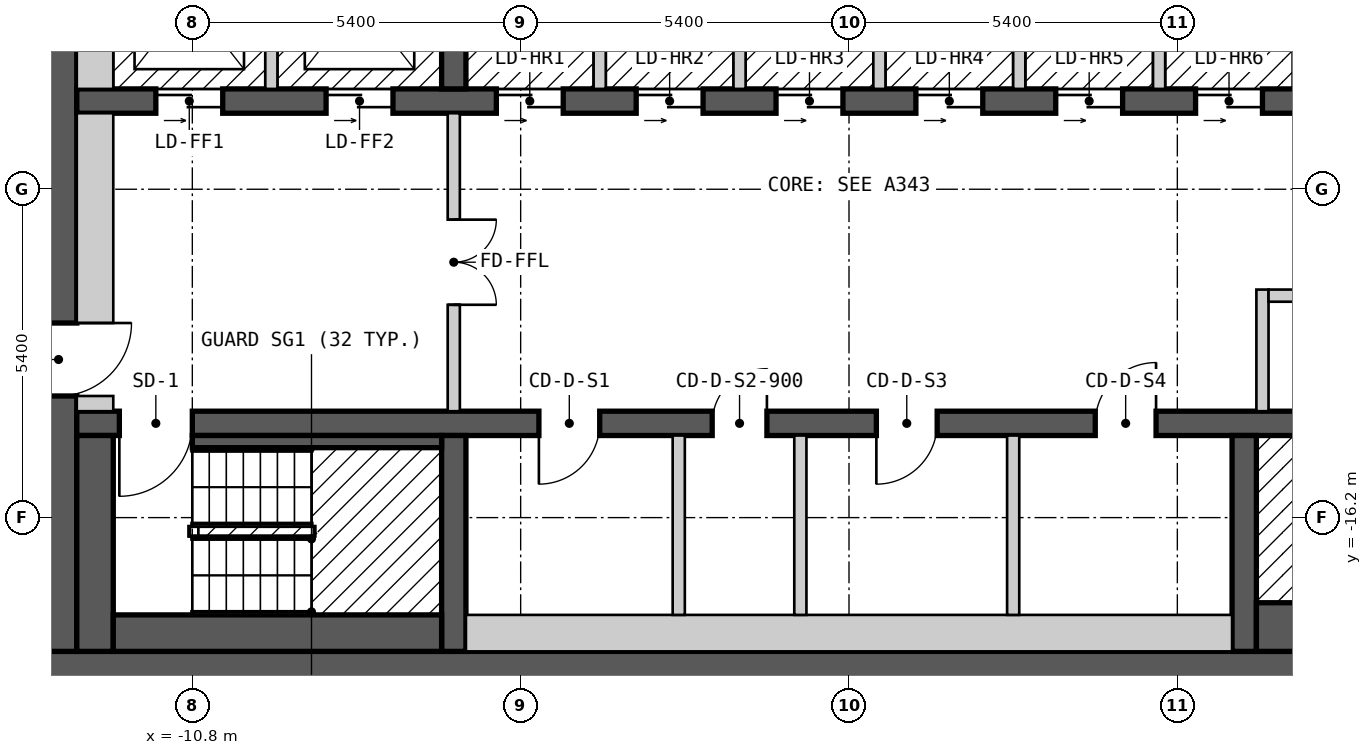
"""IFC4 building model, lengths in metres.
Left out: names, types, materials, properties, quantities, classifications, styles, units other than length and angle.
Written with IfcOpenShell. Run it as: python <this file> out.ifc"""

import sys

from ifc_helpers import new_model, si_unit, direction, frame, frame_2d, origin, place, context, subcontext, project, spatial, rectangle, extrude, element, fill, save


model = new_model("IFC4")
c1 = context("Model", 3, precision=1e-05, world=origin(), true_north=direction((0.0, 1.0)))
c2 = subcontext(c1, "Body", "Model", "MODEL_VIEW")
j1 = project(units=[si_unit("LENGTHUNIT", "METRE"), si_unit("PLANEANGLEUNIT", "RADIAN")], contexts=[c1])
p1 = place(None, origin())
s1 = spatial("IfcSite", under=j1, at=p1, CompositionType="ELEMENT")
p2 = place(p1, origin())
s2 = spatial("IfcBuilding", under=s1, at=p2, CompositionType="ELEMENT")
p3 = place(p2, frame((0.0, 0.0, 157.2)))
s3 = spatial("IfcBuildingStorey", under=s2, at=p3, CompositionType="ELEMENT", Elevation=157.2)
p4 = place(p3, frame((-13.3, -18.7, 0.0), z_axis=(0.0, 0.0, 1.0), x_axis=(1.0, 0.0, 0.0)))
e1 = element("IfcWall", 1, at=p4, inside=s3, PredefinedType="SHEAR", context=c2, shape_type="SweptSolid", body=[
    extrude(rectangle(XDim=26.6, YDim=0.6, at=frame_2d((13.3, 0.0))), origin(), (0.0, 0.0, 1.0), 5.7),
])
p5 = place(p3, frame((-13.0, -18.4, 0.0), z_axis=(0.0, 0.0, 1.0), x_axis=(0.0, 1.0, 0.0)))
e2 = element("IfcWall", 2, at=p5, inside=s3, PredefinedType="SHEAR", context=c2, shape_type="SweptSolid", body=[
    extrude(rectangle(XDim=12.8, YDim=0.6, at=frame_2d((6.4, 0.0))), origin(), (0.0, 0.0, 1.0), 5.7),
])
p6 = place(p5, frame((4.2, 0.0, 0.0)))
e3 = element("IfcOpeningElement", 3, at=p6, cuts=e2, PredefinedType="OPENING", context=c2, shape_type="SweptSolid", body=[
    extrude(rectangle(XDim=1.2, YDim=2.1, at=frame_2d((0.6, 1.05))), frame((0.0, 0.31, 0.0), z_axis=(0.0, -1.0, 0.0), x_axis=(1.0, 0.0, 0.0)), (0.0, 0.0, 1.0), 0.62),
])
p7 = place(p3, frame((-12.7, -14.65, 0.0), z_axis=(0.0, 0.0, 1.0), x_axis=(1.0, 0.0, 0.0)))
e4 = element("IfcWall", 4, at=p7, inside=s3, PredefinedType="SHEAR", context=c2, shape_type="SweptSolid", body=[
    extrude(rectangle(XDim=25.4, YDim=0.4, at=frame_2d((12.7, 0.0))), origin(), (0.0, 0.0, 1.0), 5.7),
])
p8 = place(p7, frame((1.9, 0.0, 0.0), z_axis=(0.0, 0.0, 1.0), x_axis=(-1.0, 0.0, 0.0)))
e5 = element("IfcOpeningElement", 5, at=p8, cuts=e4, PredefinedType="OPENING", context=c2, shape_type="SweptSolid", body=[
    extrude(rectangle(XDim=1.2, YDim=2.1, at=frame_2d((0.6, 1.05))), frame((0.0, 0.21, 0.0), z_axis=(0.0, -1.0, 0.0), x_axis=(1.0, 0.0, 0.0)), (0.0, 0.0, 1.0), 0.42),
])
p9 = place(p7, frame((24.75, 0.0, 0.0), z_axis=(0.0, 0.0, 1.0), x_axis=(-1.0, 0.0, 0.0)))
e6 = element("IfcOpeningElement", 6, at=p9, cuts=e4, PredefinedType="OPENING", context=c2, shape_type="SweptSolid", body=[
    extrude(rectangle(XDim=1.2, YDim=2.1, at=frame_2d((0.6, 1.05))), frame((0.0, 0.21, 0.0), z_axis=(0.0, -1.0, 0.0), x_axis=(1.0, 0.0, 0.0)), (0.0, 0.0, 1.0), 0.42),
])
p10 = place(p7, frame((8.6, 0.0, 0.0), z_axis=(0.0, 0.0, 1.0), x_axis=(-1.0, 0.0, 0.0)))
e7 = element("IfcOpeningElement", 7, at=p10, cuts=e4, PredefinedType="OPENING", context=c2, shape_type="SweptSolid", body=[
    extrude(rectangle(XDim=1.0, YDim=2.1, at=frame_2d((0.5, 1.05))), frame((0.0, 0.21, 0.0), z_axis=(0.0, -1.0, 0.0), x_axis=(1.0, 0.0, 0.0)), (0.0, 0.0, 1.0), 0.42),
])
p11 = place(p7, frame((11.35, 0.0, 0.0), z_axis=(0.0, 0.0, 1.0), x_axis=(-1.0, 0.0, 0.0)))
e8 = element("IfcOpeningElement", 8, at=p11, cuts=e4, PredefinedType="OPENING", context=c2, shape_type="SweptSolid", body=[
    extrude(rectangle(XDim=0.9, YDim=2.1, at=frame_2d((0.45, 1.05))), frame((0.0, 0.21, 0.0), z_axis=(0.0, -1.0, 0.0), x_axis=(1.0, 0.0, 0.0)), (0.0, 0.0, 1.0), 0.42),
])
p12 = place(p7, frame((14.15, 0.0, 0.0), z_axis=(0.0, 0.0, 1.0), x_axis=(-1.0, 0.0, 0.0)))
e9 = element("IfcOpeningElement", 9, at=p12, cuts=e4, PredefinedType="OPENING", context=c2, shape_type="SweptSolid", body=[
    extrude(rectangle(XDim=1.0, YDim=2.1, at=frame_2d((0.5, 1.05))), frame((0.0, 0.21, 0.0), z_axis=(0.0, -1.0, 0.0), x_axis=(1.0, 0.0, 0.0)), (0.0, 0.0, 1.0), 0.42),
])
p13 = place(p7, frame((17.75, 0.0, 0.0), z_axis=(0.0, 0.0, 1.0), x_axis=(-1.0, 0.0, 0.0)))
e10 = element("IfcOpeningElement", 10, at=p13, cuts=e4, PredefinedType="OPENING", context=c2, shape_type="SweptSolid", body=[
    extrude(rectangle(XDim=1.0, YDim=2.1, at=frame_2d((0.5, 1.05))), frame((0.0, 0.21, 0.0), z_axis=(0.0, -1.0, 0.0), x_axis=(1.0, 0.0, 0.0)), (0.0, 0.0, 1.0), 0.42),
])
p14 = place(p3, frame((-12.7, -9.35, 0.0), z_axis=(0.0, 0.0, 1.0), x_axis=(1.0, 0.0, 0.0)))
e11 = element("IfcWall", 11, at=p14, inside=s3, PredefinedType="SHEAR", context=c2, shape_type="SweptSolid", body=[
    extrude(rectangle(XDim=22.9, YDim=0.4, at=frame_2d((11.45, 0.0))), origin(), (0.0, 0.0, 1.0), 5.7),
])
p15 = place(p14, frame((1.3, 0.0, 0.0)))
e12 = element("IfcOpeningElement", 12, at=p15, cuts=e11, PredefinedType="OPENING", context=c2, shape_type="SweptSolid", body=[
    extrude(rectangle(XDim=1.1, YDim=2.1, at=frame_2d((0.55, 1.05))), frame((0.0, 0.21, 0.0), z_axis=(0.0, -1.0, 0.0), x_axis=(1.0, 0.0, 0.0)), (0.0, 0.0, 1.0), 0.42),
])
p16 = place(p14, frame((4.1, 0.0, 0.0)))
e13 = element("IfcOpeningElement", 13, at=p16, cuts=e11, PredefinedType="OPENING", context=c2, shape_type="SweptSolid", body=[
    extrude(rectangle(XDim=1.1, YDim=2.1, at=frame_2d((0.55, 1.05))), frame((0.0, 0.21, 0.0), z_axis=(0.0, -1.0, 0.0), x_axis=(1.0, 0.0, 0.0)), (0.0, 0.0, 1.0), 0.42),
])
p17 = place(p14, frame((6.9, 0.0, 0.0)))
e14 = element("IfcOpeningElement", 14, at=p17, cuts=e11, PredefinedType="OPENING", context=c2, shape_type="SweptSolid", body=[
    extrude(rectangle(XDim=1.1, YDim=2.1, at=frame_2d((0.55, 1.05))), frame((0.0, 0.21, 0.0), z_axis=(0.0, -1.0, 0.0), x_axis=(1.0, 0.0, 0.0)), (0.0, 0.0, 1.0), 0.42),
])
p18 = place(p14, frame((9.2, 0.0, 0.0)))
e15 = element("IfcOpeningElement", 15, at=p18, cuts=e11, PredefinedType="OPENING", context=c2, shape_type="SweptSolid", body=[
    extrude(rectangle(XDim=1.1, YDim=2.1, at=frame_2d((0.55, 1.05))), frame((0.0, 0.21, 0.0), z_axis=(0.0, -1.0, 0.0), x_axis=(1.0, 0.0, 0.0)), (0.0, 0.0, 1.0), 0.42),
])
p19 = place(p14, frame((11.5, 0.0, 0.0)))
e16 = element("IfcOpeningElement", 16, at=p19, cuts=e11, PredefinedType="OPENING", context=c2, shape_type="SweptSolid", body=[
    extrude(rectangle(XDim=1.1, YDim=2.1, at=frame_2d((0.55, 1.05))), frame((0.0, 0.21, 0.0), z_axis=(0.0, -1.0, 0.0), x_axis=(1.0, 0.0, 0.0)), (0.0, 0.0, 1.0), 0.42),
])
p20 = place(p14, frame((13.8, 0.0, 0.0)))
e17 = element("IfcOpeningElement", 17, at=p20, cuts=e11, PredefinedType="OPENING", context=c2, shape_type="SweptSolid", body=[
    extrude(rectangle(XDim=1.1, YDim=2.1, at=frame_2d((0.55, 1.05))), frame((0.0, 0.21, 0.0), z_axis=(0.0, -1.0, 0.0), x_axis=(1.0, 0.0, 0.0)), (0.0, 0.0, 1.0), 0.42),
])
p21 = place(p14, frame((16.1, 0.0, 0.0)))
e18 = element("IfcOpeningElement", 18, at=p21, cuts=e11, PredefinedType="OPENING", context=c2, shape_type="SweptSolid", body=[
    extrude(rectangle(XDim=1.1, YDim=2.1, at=frame_2d((0.55, 1.05))), frame((0.0, 0.21, 0.0), z_axis=(0.0, -1.0, 0.0), x_axis=(1.0, 0.0, 0.0)), (0.0, 0.0, 1.0), 0.42),
])
p22 = place(p14, frame((18.4, 0.0, 0.0)))
e19 = element("IfcOpeningElement", 19, at=p22, cuts=e11, PredefinedType="OPENING", context=c2, shape_type="SweptSolid", body=[
    extrude(rectangle(XDim=1.1, YDim=2.1, at=frame_2d((0.55, 1.05))), frame((0.0, 0.21, 0.0), z_axis=(0.0, -1.0, 0.0), x_axis=(1.0, 0.0, 0.0)), (0.0, 0.0, 1.0), 0.42),
])
p23 = place(p14, frame((20.8, 0.0, 0.0)))
e20 = element("IfcOpeningElement", 20, at=p23, cuts=e11, PredefinedType="OPENING", context=c2, shape_type="SweptSolid", body=[
    extrude(rectangle(XDim=1.1, YDim=2.1, at=frame_2d((0.55, 1.05))), frame((0.0, 0.21, 0.0), z_axis=(0.0, -1.0, 0.0), x_axis=(1.0, 0.0, 0.0)), (0.0, 0.0, 1.0), 0.42),
])
for number, where, z_axis, x_axis in (
    (21, (-6.5, -18.4, 0.0), (0.0, 0.0, 1.0), (0.0, 1.0, 0.0)),
    (22, (6.5, -18.4, 0.0), (0.0, 0.0, 1.0), (0.0, 1.0, 0.0)),
    (23, (-6.5, -9.15, 0.0), (0.0, 0.0, 1.0), (0.0, 1.0, 0.0)),
):
    element("IfcWall", number, at=place(p3, frame(where, z_axis=z_axis, x_axis=x_axis)), inside=s3, PredefinedType="SHEAR", context=c2, shape_type="SweptSolid", body=[
        extrude(rectangle(XDim=3.55, YDim=0.4, at=frame_2d((1.775, 0.0))), origin(), (0.0, 0.0, 1.0), 5.7),
    ])
p24 = place(p3, frame((-12.4, -18.4, 0.0), z_axis=(0.0, 0.0, 1.0), x_axis=(0.0, 1.0, 0.0)))
e24 = element("IfcWall", 24, at=p24, inside=s3, PredefinedType="SOLIDWALL", context=c2, shape_type="SweptSolid", body=[
    extrude(rectangle(XDim=3.55, YDim=0.6, at=frame_2d((1.775, 0.0))), origin(), (0.0, 0.0, 1.0), 5.7),
])
p25 = place(p3, frame((-12.7, -14.325, 0.0), z_axis=(0.0, 0.0, 1.0), x_axis=(1.0, 0.0, 0.0)))
e25 = element("IfcWall", 25, at=p25, inside=s3, PredefinedType="PARTITIONING", context=c2, shape_type="SweptSolid", body=[
    extrude(rectangle(XDim=0.6, YDim=0.25, at=frame_2d((0.3, 0.0))), origin(), (0.0, 0.0, 1.0), 5.7),
])
p26 = place(p3, frame((-12.4, -13.0, 0.0), z_axis=(0.0, 0.0, 1.0), x_axis=(0.0, 1.0, 0.0)))
e26 = element("IfcWall", 26, at=p26, inside=s3, PredefinedType="PARTITIONING", context=c2, shape_type="SweptSolid", body=[
    extrude(rectangle(XDim=3.45, YDim=0.6, at=frame_2d((1.725, 0.0))), origin(), (0.0, 0.0, 1.0), 5.7),
])
p27 = place(p3, frame((-12.4, -9.15, 0.0), z_axis=(0.0, 0.0, 1.0), x_axis=(0.0, 1.0, 0.0)))
e27 = element("IfcWall", 27, at=p27, inside=s3, PredefinedType="SOLIDWALL", context=c2, shape_type="SweptSolid", body=[
    extrude(rectangle(XDim=3.55, YDim=0.6, at=frame_2d((1.775, 0.0))), origin(), (0.0, 0.0, 1.0), 5.7),
])
p28 = place(p3, frame((-12.1, -18.1, 0.0), z_axis=(0.0, 0.0, 1.0), x_axis=(1.0, 0.0, 0.0)))
e28 = element("IfcWall", 28, at=p28, inside=s3, PredefinedType="SOLIDWALL", context=c2, shape_type="SweptSolid", body=[
    extrude(rectangle(XDim=5.4, YDim=0.6, at=frame_2d((2.7, 0.0))), origin(), (0.0, 0.0, 1.0), 5.7),
])
p29 = place(p3, frame((-10.8, -14.95, 0.0), z_axis=(0.0, 0.0, 1.0), x_axis=(1.0, 0.0, 0.0)))
e29 = element("IfcWall", 29, at=p29, inside=s3, PredefinedType="SOLIDWALL", context=c2, shape_type="SweptSolid", body=[
    extrude(rectangle(XDim=4.1, YDim=0.2, at=frame_2d((2.05, 0.0))), origin(), (0.0, 0.0, 1.0), 5.7),
])
p30 = place(p3, frame((-9.5, -9.15, 0.0), z_axis=(0.0, 0.0, 1.0), x_axis=(0.0, 1.0, 0.0)))
e30 = element("IfcWall", 30, at=p30, inside=s3, PredefinedType="SOLIDWALL", context=c2, shape_type="SweptSolid", body=[
    extrude(rectangle(XDim=2.95, YDim=0.2, at=frame_2d((1.475, 0.0))), origin(), (0.0, 0.0, 1.0), 5.7),
])
p31 = place(p3, frame((-6.5, -14.45, 0.0), z_axis=(0.0, 0.0, 1.0), x_axis=(0.0, 1.0, 0.0)))
e31 = element("IfcWall", 31, at=p31, inside=s3, PredefinedType="PARTITIONING", context=c2, shape_type="SweptSolid", body=[
    extrude(rectangle(XDim=4.9, YDim=0.2, at=frame_2d((2.45, 0.0))), origin(), (0.0, 0.0, 1.0), 5.7),
])
p32 = place(p31, frame((3.15, 0.0, 0.0), z_axis=(0.0, 0.0, 1.0), x_axis=(-1.0, 0.0, 0.0)))
e32 = element("IfcOpeningElement", 32, at=p32, cuts=e31, PredefinedType="OPENING", context=c2, shape_type="SweptSolid", body=[
    extrude(rectangle(XDim=1.4, YDim=2.1, at=frame_2d((0.7, 1.05))), frame((0.0, 0.11, 0.0), z_axis=(0.0, -1.0, 0.0), x_axis=(1.0, 0.0, 0.0)), (0.0, 0.0, 1.0), 0.22),
])
p33 = place(p3, frame((-6.3, -18.1, 0.0), z_axis=(0.0, 0.0, 1.0), x_axis=(1.0, 0.0, 0.0)))
e33 = element("IfcWall", 33, at=p33, inside=s3, PredefinedType="PARTITIONING", context=c2, shape_type="SweptSolid", body=[
    extrude(rectangle(XDim=12.6, YDim=0.6, at=frame_2d((6.3, 0.0))), origin(), (0.0, 0.0, 1.0), 5.7),
])
p34 = place(p3, frame((-4.1, -9.15, 0.0), z_axis=(0.0, 0.0, 1.0), x_axis=(0.0, 1.0, 0.0)))
e34 = element("IfcWall", 34, at=p34, inside=s3, PredefinedType="SOLIDWALL", context=c2, shape_type="SweptSolid", body=[
    extrude(rectangle(XDim=2.95, YDim=0.2, at=frame_2d((1.475, 0.0))), origin(), (0.0, 0.0, 1.0), 5.7),
])
p35 = place(p3, frame((-2.8, -17.8, 0.0), z_axis=(0.0, 0.0, 1.0), x_axis=(0.0, 1.0, 0.0)))
e35 = element("IfcWall", 35, at=p35, inside=s3, PredefinedType="PARTITIONING", context=c2, shape_type="SweptSolid", body=[
    extrude(rectangle(XDim=2.95, YDim=0.2, at=frame_2d((1.475, 0.0))), origin(), (0.0, 0.0, 1.0), 5.7),
])
p36 = place(p3, frame((-1.8, -9.15, 0.0), z_axis=(0.0, 0.0, 1.0), x_axis=(0.0, 1.0, 0.0)))
e36 = element("IfcWall", 36, at=p36, inside=s3, PredefinedType="SOLIDWALL", context=c2, shape_type="SweptSolid", body=[
    extrude(rectangle(XDim=2.95, YDim=0.2, at=frame_2d((1.475, 0.0))), origin(), (0.0, 0.0, 1.0), 5.7),
])
p37 = place(p3, frame((-0.8, -17.8, 0.0), z_axis=(0.0, 0.0, 1.0), x_axis=(0.0, 1.0, 0.0)))
e37 = element("IfcWall", 37, at=p37, inside=s3, PredefinedType="PARTITIONING", context=c2, shape_type="SweptSolid", body=[
    extrude(rectangle(XDim=2.95, YDim=0.2, at=frame_2d((1.475, 0.0))), origin(), (0.0, 0.0, 1.0), 5.7),
])
p38 = place(p3, frame((0.5, -9.15, 0.0), z_axis=(0.0, 0.0, 1.0), x_axis=(0.0, 1.0, 0.0)))
e38 = element("IfcWall", 38, at=p38, inside=s3, PredefinedType="SOLIDWALL", context=c2, shape_type="SweptSolid", body=[
    extrude(rectangle(XDim=2.95, YDim=0.2, at=frame_2d((1.475, 0.0))), origin(), (0.0, 0.0, 1.0), 5.7),
])
p39 = place(p3, frame((2.7, -17.8, 0.0), z_axis=(0.0, 0.0, 1.0), x_axis=(0.0, 1.0, 0.0)))
e39 = element("IfcWall", 39, at=p39, inside=s3, PredefinedType="PARTITIONING", context=c2, shape_type="SweptSolid", body=[
    extrude(rectangle(XDim=2.95, YDim=0.2, at=frame_2d((1.475, 0.0))), origin(), (0.0, 0.0, 1.0), 5.7),
])
for number, where, z_axis, x_axis in (
    (40, (2.8, -9.15, 0.0), (0.0, 0.0, 1.0), (0.0, 1.0, 0.0)),
    (41, (5.1, -9.15, 0.0), (0.0, 0.0, 1.0), (0.0, 1.0, 0.0)),
):
    element("IfcWall", number, at=place(p3, frame(where, z_axis=z_axis, x_axis=x_axis)), inside=s3, PredefinedType="SOLIDWALL", context=c2, shape_type="SweptSolid", body=[
        extrude(rectangle(XDim=2.95, YDim=0.2, at=frame_2d((1.475, 0.0))), origin(), (0.0, 0.0, 1.0), 5.7),
    ])
p40 = place(p3, frame((6.7, -18.0, 0.0), z_axis=(0.0, 0.0, 1.0), x_axis=(1.0, 0.0, 0.0)))
e42 = element("IfcWall", 42, at=p40, inside=s3, PredefinedType="SOLIDWALL", context=c2, shape_type="SweptSolid", body=[
    extrude(rectangle(XDim=6.0, YDim=0.8, at=frame_2d((3.0, 0.0))), origin(), (0.0, 0.0, 1.0), 5.7),
])
p41 = place(p3, frame((6.8, -14.45, 0.0), z_axis=(0.0, 0.0, 1.0), x_axis=(0.0, 1.0, 0.0)))
e43 = element("IfcWall", 43, at=p41, inside=s3, PredefinedType="PARTITIONING", context=c2, shape_type="SweptSolid", body=[
    extrude(rectangle(XDim=2.0, YDim=0.2, at=frame_2d((1.0, 0.0))), origin(), (0.0, 0.0, 1.0), 5.7),
])
p42 = place(p3, frame((6.9, -12.55, 0.0), z_axis=(0.0, 0.0, 1.0), x_axis=(1.0, 0.0, 0.0)))
e44 = element("IfcWall", 44, at=p42, inside=s3, PredefinedType="PARTITIONING", context=c2, shape_type="SweptSolid", body=[
    extrude(rectangle(XDim=3.3, YDim=0.2, at=frame_2d((1.65, 0.0))), origin(), (0.0, 0.0, 1.0), 5.7),
])
p43 = place(p42, frame((2.05, 0.0, 0.0), z_axis=(0.0, 0.0, 1.0), x_axis=(-1.0, 0.0, 0.0)))
e45 = element("IfcOpeningElement", 45, at=p43, cuts=e44, PredefinedType="OPENING", context=c2, shape_type="SweptSolid", body=[
    extrude(rectangle(XDim=1.0, YDim=2.1, at=frame_2d((0.5, 1.05))), frame((0.0, 0.11, 0.0), z_axis=(0.0, -1.0, 0.0), x_axis=(1.0, 0.0, 0.0)), (0.0, 0.0, 1.0), 0.22),
])
p44 = place(p3, frame((7.4, -9.15, 0.0), z_axis=(0.0, 0.0, 1.0), x_axis=(0.0, 1.0, 0.0)))
e46 = element("IfcWall", 46, at=p44, inside=s3, PredefinedType="SOLIDWALL", context=c2, shape_type="SweptSolid", body=[
    extrude(rectangle(XDim=2.95, YDim=0.2, at=frame_2d((1.475, 0.0))), origin(), (0.0, 0.0, 1.0), 5.7),
])
p45 = place(p15, origin())
e47 = element("IfcDoor", 47, at=p45, inside=s3, OperationType="DOUBLE_DOOR_SLIDING", PredefinedType="DOOR", context=c2, shape_type="SweptSolid", body=[
    extrude(rectangle(XDim=1.1, YDim=2.1, at=frame_2d((0.55, 1.05))), frame((0.0, 0.025, 0.0), z_axis=(0.0, -1.0, 0.0), x_axis=(1.0, 0.0, 0.0)), (0.0, 0.0, 1.0), 0.05),
])
fill(e12, e47)
p46 = place(p16, origin())
e48 = element("IfcDoor", 48, at=p46, inside=s3, OperationType="DOUBLE_DOOR_SLIDING", PredefinedType="DOOR", context=c2, shape_type="SweptSolid", body=[
    extrude(rectangle(XDim=1.1, YDim=2.1, at=frame_2d((0.55, 1.05))), frame((0.0, 0.025, 0.0), z_axis=(0.0, -1.0, 0.0), x_axis=(1.0, 0.0, 0.0)), (0.0, 0.0, 1.0), 0.05),
])
fill(e13, e48)
p47 = place(p17, origin())
e49 = element("IfcDoor", 49, at=p47, inside=s3, OperationType="DOUBLE_DOOR_SLIDING", PredefinedType="DOOR", context=c2, shape_type="SweptSolid", body=[
    extrude(rectangle(XDim=1.1, YDim=2.1, at=frame_2d((0.55, 1.05))), frame((0.0, 0.025, 0.0), z_axis=(0.0, -1.0, 0.0), x_axis=(1.0, 0.0, 0.0)), (0.0, 0.0, 1.0), 0.05),
])
fill(e14, e49)
p48 = place(p18, origin())
e50 = element("IfcDoor", 50, at=p48, inside=s3, OperationType="DOUBLE_DOOR_SLIDING", PredefinedType="DOOR", context=c2, shape_type="SweptSolid", body=[
    extrude(rectangle(XDim=1.1, YDim=2.1, at=frame_2d((0.55, 1.05))), frame((0.0, 0.025, 0.0), z_axis=(0.0, -1.0, 0.0), x_axis=(1.0, 0.0, 0.0)), (0.0, 0.0, 1.0), 0.05),
])
fill(e15, e50)
p49 = place(p19, origin())
e51 = element("IfcDoor", 51, at=p49, inside=s3, OperationType="DOUBLE_DOOR_SLIDING", PredefinedType="DOOR", context=c2, shape_type="SweptSolid", body=[
    extrude(rectangle(XDim=1.1, YDim=2.1, at=frame_2d((0.55, 1.05))), frame((0.0, 0.025, 0.0), z_axis=(0.0, -1.0, 0.0), x_axis=(1.0, 0.0, 0.0)), (0.0, 0.0, 1.0), 0.05),
])
fill(e16, e51)
p50 = place(p20, origin())
e52 = element("IfcDoor", 52, at=p50, inside=s3, OperationType="DOUBLE_DOOR_SLIDING", PredefinedType="DOOR", context=c2, shape_type="SweptSolid", body=[
    extrude(rectangle(XDim=1.1, YDim=2.1, at=frame_2d((0.55, 1.05))), frame((0.0, 0.025, 0.0), z_axis=(0.0, -1.0, 0.0), x_axis=(1.0, 0.0, 0.0)), (0.0, 0.0, 1.0), 0.05),
])
fill(e17, e52)
p51 = place(p21, origin())
e53 = element("IfcDoor", 53, at=p51, inside=s3, OperationType="DOUBLE_DOOR_SLIDING", PredefinedType="DOOR", context=c2, shape_type="SweptSolid", body=[
    extrude(rectangle(XDim=1.1, YDim=2.1, at=frame_2d((0.55, 1.05))), frame((0.0, 0.025, 0.0), z_axis=(0.0, -1.0, 0.0), x_axis=(1.0, 0.0, 0.0)), (0.0, 0.0, 1.0), 0.05),
])
fill(e18, e53)
p52 = place(p22, origin())
e54 = element("IfcDoor", 54, at=p52, inside=s3, OperationType="DOUBLE_DOOR_SLIDING", PredefinedType="DOOR", context=c2, shape_type="SweptSolid", body=[
    extrude(rectangle(XDim=1.1, YDim=2.1, at=frame_2d((0.55, 1.05))), frame((0.0, 0.025, 0.0), z_axis=(0.0, -1.0, 0.0), x_axis=(1.0, 0.0, 0.0)), (0.0, 0.0, 1.0), 0.05),
])
fill(e19, e54)
p53 = place(p8, origin())
e55 = element("IfcDoor", 55, at=p53, inside=s3, OperationType="SINGLE_SWING_RIGHT", PredefinedType="DOOR", context=c2, shape_type="SweptSolid", body=[
    extrude(rectangle(XDim=1.2, YDim=2.1, at=frame_2d((0.6, 1.05))), frame((0.0, 0.025, 0.0), z_axis=(0.0, -1.0, 0.0), x_axis=(1.0, 0.0, 0.0)), (0.0, 0.0, 1.0), 0.05),
])
fill(e5, e55)
p54 = place(p6, origin())
e56 = element("IfcDoor", 56, at=p54, inside=s3, OperationType="SINGLE_SWING_RIGHT", PredefinedType="DOOR", context=c2, shape_type="SweptSolid", body=[
    extrude(rectangle(XDim=1.2, YDim=2.1, at=frame_2d((0.6, 1.05))), frame((0.0, 0.025, 0.0), z_axis=(0.0, -1.0, 0.0), x_axis=(1.0, 0.0, 0.0)), (0.0, 0.0, 1.0), 0.05),
])
fill(e3, e56)
p55 = place(p32, origin())
e57 = element("IfcDoor", 57, at=p55, inside=s3, OperationType="DOUBLE_DOOR_SINGLE_SWING", PredefinedType="DOOR", context=c2, shape_type="SweptSolid", body=[
    extrude(rectangle(XDim=1.4, YDim=2.1, at=frame_2d((0.7, 1.05))), frame((0.0, 0.025, 0.0), z_axis=(0.0, -1.0, 0.0), x_axis=(1.0, 0.0, 0.0)), (0.0, 0.0, 1.0), 0.05),
])
fill(e32, e57)
p56 = place(p10, origin())
e58 = element("IfcDoor", 58, at=p56, inside=s3, OperationType="SINGLE_SWING_RIGHT", PredefinedType="DOOR", context=c2, shape_type="SweptSolid", body=[
    extrude(rectangle(XDim=1.0, YDim=2.1, at=frame_2d((0.5, 1.05))), frame((0.0, 0.025, 0.0), z_axis=(0.0, -1.0, 0.0), x_axis=(1.0, 0.0, 0.0)), (0.0, 0.0, 1.0), 0.05),
])
fill(e7, e58)
p57 = place(p11, origin())
e59 = element("IfcDoor", 59, at=p57, inside=s3, OperationType="SINGLE_SWING_LEFT", PredefinedType="DOOR", context=c2, shape_type="SweptSolid", body=[
    extrude(rectangle(XDim=0.9, YDim=2.1, at=frame_2d((0.45, 1.05))), frame((0.0, 0.025, 0.0), z_axis=(0.0, -1.0, 0.0), x_axis=(1.0, 0.0, 0.0)), (0.0, 0.0, 1.0), 0.05),
])
fill(e8, e59)
p58 = place(p12, origin())
e60 = element("IfcDoor", 60, at=p58, inside=s3, OperationType="SINGLE_SWING_RIGHT", PredefinedType="DOOR", context=c2, shape_type="SweptSolid", body=[
    extrude(rectangle(XDim=1.0, YDim=2.1, at=frame_2d((0.5, 1.05))), frame((0.0, 0.025, 0.0), z_axis=(0.0, -1.0, 0.0), x_axis=(1.0, 0.0, 0.0)), (0.0, 0.0, 1.0), 0.05),
])
fill(e9, e60)
p59 = place(p13, origin())
e61 = element("IfcDoor", 61, at=p59, inside=s3, OperationType="SINGLE_SWING_LEFT", PredefinedType="DOOR", context=c2, shape_type="SweptSolid", body=[
    extrude(rectangle(XDim=1.0, YDim=2.1, at=frame_2d((0.5, 1.05))), frame((0.0, 0.025, 0.0), z_axis=(0.0, -1.0, 0.0), x_axis=(1.0, 0.0, 0.0)), (0.0, 0.0, 1.0), 0.05),
])
fill(e10, e61)
save(model, sys.argv[1])
